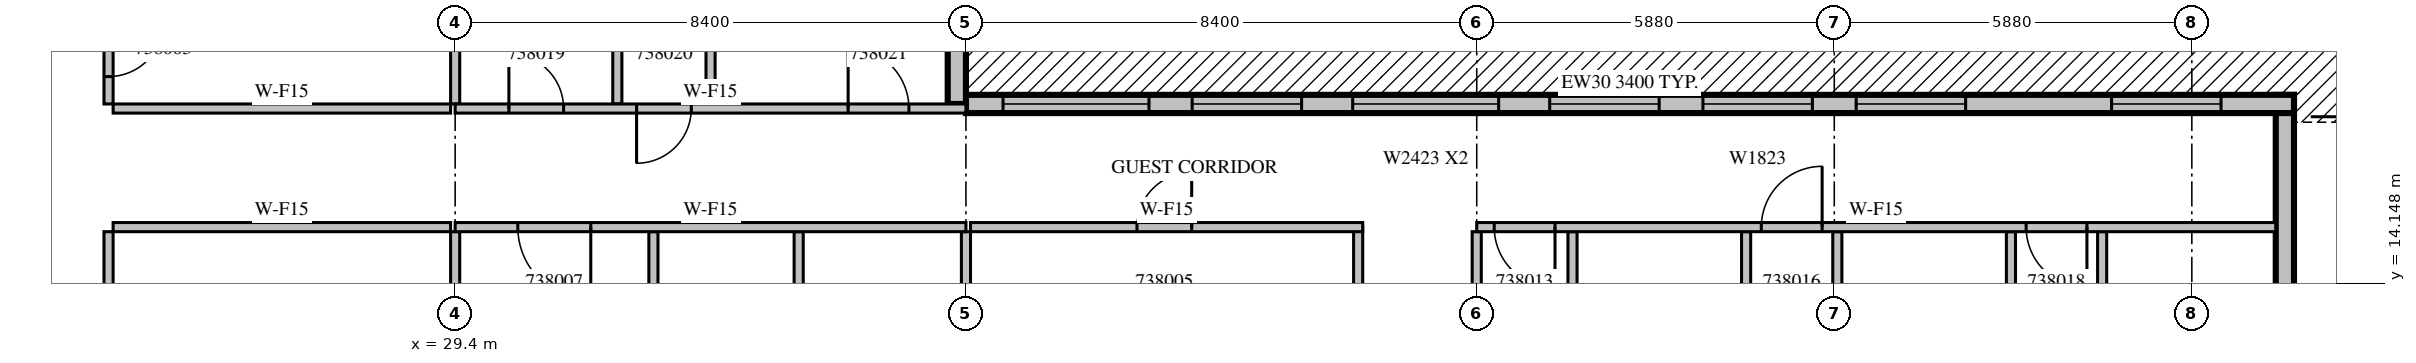
"""IFC4 building model, lengths in metres.
Left out: names, types, materials, properties, quantities, classifications, styles, units other than length and angle.
Written with IfcOpenShell. Run it as: python <this file> out.ifc"""

import sys

from ifc_helpers import new_model, si_unit, direction, frame, frame_2d, origin, place, context, subcontext, project, spatial, rectangle, extrude, source, transform, mapped, element, fill, save


model = new_model("IFC4")
c1 = context("Model", 3, precision=1e-05, world=origin(), true_north=direction((0.0, 1.0)))
c2 = subcontext(c1, "Body", "Model", "MODEL_VIEW")
j1 = project(units=[si_unit("LENGTHUNIT", "METRE"), si_unit("PLANEANGLEUNIT", "RADIAN")], contexts=[c1])
p1 = place(None, origin())
s1 = spatial("IfcSite", under=j1, at=p1, CompositionType="ELEMENT")
p2 = place(p1, origin())
s2 = spatial("IfcBuilding", under=s1, at=p2, CompositionType="ELEMENT")
p3 = place(p2, frame((0.0, 0.0, 177.8)))
s3 = spatial("IfcBuildingStorey", under=s2, at=p3, CompositionType="ELEMENT", Elevation=177.8)
p4 = place(p3, frame((59.49, 10.5, 0.0), z_axis=(0.0, 0.0, 1.0), x_axis=(0.0, 1.0, 0.0)))
e1 = element("IfcWall", 1, at=p4, inside=s3, PredefinedType="STANDARD", context=c2, shape_type="SweptSolid", body=[
    extrude(rectangle(XDim=6.75, YDim=0.3, at=frame_2d((3.375, 0.0))), origin(), (0.0, 0.0, 1.0), 3.4),
])
m1 = source(origin(), c2, "Body", "SweptSolid", [
    extrude(rectangle(XDim=1.8, YDim=2.4, at=frame_2d((0.9, 1.2))), frame((0.0, 0.16, 0.0), z_axis=(0.0, -1.0, 0.0), x_axis=(1.0, 0.0, 0.0)), (0.0, 0.0, 1.0), 0.32),
])
p5 = place(p4, frame((0.787, 0.0, 0.0)))
e2 = element("IfcOpeningElement", 2, at=p5, cuts=e1, PredefinedType="OPENING", context=c2, shape_type="MappedRepresentation", body=[
    mapped(m1, transform((0.0, 0.0, 0.0), scale=1.0)),
])
p6 = place(p3, frame((59.64, 17.1, 0.0), z_axis=(0.0, 0.0, 1.0), x_axis=(-1.0, 0.0, 0.0)))
e3 = element("IfcWall", 3, at=p6, inside=s3, PredefinedType="STANDARD", context=c2, shape_type="SweptSolid", body=[
    extrude(rectangle(XDim=21.84, YDim=0.3, at=frame_2d((10.92, 0.0))), origin(), (0.0, 0.0, 1.0), 3.4),
])
p7 = place(p6, frame((1.2, 0.0, 0.0)))
e4 = element("IfcOpeningElement", 4, at=p7, cuts=e3, PredefinedType="OPENING", context=c2, shape_type="MappedRepresentation", body=[
    mapped(m1, transform((0.0, 0.0, 0.0), scale=1.0)),
])
p8 = place(p6, frame((5.4, 0.0, 0.0)))
e5 = element("IfcOpeningElement", 5, at=p8, cuts=e3, PredefinedType="OPENING", context=c2, shape_type="MappedRepresentation", body=[
    mapped(m1, transform((0.0, 0.0, 0.0), scale=1.0)),
])
p9 = place(p6, frame((10.44, 0.0, 0.0)))
e6 = element("IfcOpeningElement", 6, at=p9, cuts=e3, PredefinedType="OPENING", context=c2, shape_type="MappedRepresentation", body=[
    mapped(m1, transform((0.0, 0.0, 0.0), scale=1.0)),
])
p10 = place(p6, frame((16.32, 0.0, 0.0)))
e7 = element("IfcOpeningElement", 7, at=p10, cuts=e3, PredefinedType="OPENING", context=c2, shape_type="MappedRepresentation", body=[
    mapped(m1, transform((0.0, 0.0, 0.0), scale=1.0)),
])
m2 = source(origin(), c2, "Body", "SweptSolid", [
    extrude(rectangle(XDim=1.8, YDim=2.3, at=frame_2d((0.9, 1.15))), frame((0.0, 0.16, 0.0), z_axis=(0.0, -1.0, 0.0), x_axis=(1.0, 0.0, 0.0)), (0.0, 0.0, 1.0), 0.32),
])
p11 = place(p6, frame((7.92, 0.0, 0.6)))
e8 = element("IfcOpeningElement", 8, at=p11, cuts=e3, PredefinedType="OPENING", context=c2, shape_type="MappedRepresentation", body=[
    mapped(m2, transform((0.0, 0.0, 0.0), scale=1.0)),
])
p12 = place(p6, frame((13.08, 0.0, 0.6)))
e9 = element("IfcOpeningElement", 9, at=p12, cuts=e3, PredefinedType="OPENING", context=c2, shape_type="SweptSolid", body=[
    extrude(rectangle(XDim=2.4, YDim=2.3, at=frame_2d((1.2, 1.15))), frame((0.0, 0.16, 0.0), z_axis=(0.0, -1.0, 0.0), x_axis=(1.0, 0.0, 0.0)), (0.0, 0.0, 1.0), 0.32),
])
m3 = source(origin(), c2, "Body", "SweptSolid", [
    extrude(rectangle(XDim=2.4, YDim=2.3, at=frame_2d((1.2, 1.15))), frame((0.0, 0.16, 0.0), z_axis=(0.0, -1.0, 0.0), x_axis=(1.0, 0.0, 0.0)), (0.0, 0.0, 1.0), 0.32),
])
p13 = place(p6, frame((18.83, 0.0, 0.6)))
e10 = element("IfcOpeningElement", 10, at=p13, cuts=e3, PredefinedType="OPENING", context=c2, shape_type="MappedRepresentation", body=[
    mapped(m3, transform((0.0, 0.0, 0.0), scale=1.0)),
])
p14 = place(p3, frame((37.65, 17.1, 0.0), z_axis=(0.0, 0.0, 1.0), x_axis=(0.0, 1.0, 0.0)))
e11 = element("IfcWall", 11, at=p14, inside=s3, PredefinedType="STANDARD", context=c2, shape_type="SweptSolid", body=[
    extrude(rectangle(XDim=3.0, YDim=0.3, at=frame_2d((1.5, 0.0))), origin(), (0.0, 0.0, 1.0), 3.4),
])
p15 = place(p14, frame((1.1, 0.0, 0.0)))
e12 = element("IfcOpeningElement", 12, at=p15, cuts=e11, PredefinedType="OPENING", context=c2, shape_type="MappedRepresentation", body=[
    mapped(m1, transform((0.0, 0.0, 0.0), scale=1.0)),
])
p16 = place(p3, frame((23.7, 15.0, 0.0), z_axis=(0.0, 0.0, 1.0), x_axis=(0.0, -1.0, 0.0)))
e13 = element("IfcWall", 13, at=p16, inside=s3, PredefinedType="PARTITIONING", context=c2, shape_type="SweptSolid", body=[
    extrude(rectangle(XDim=11.525, YDim=0.15, at=frame_2d((5.763, 0.0))), origin(), (0.0, 0.0, 1.0), 2.4),
])
m4 = source(origin(), c2, "Body", "SweptSolid", [
    extrude(rectangle(XDim=0.9, YDim=2.1, at=frame_2d((0.45, 1.05))), frame((0.0, 0.085, 0.0), z_axis=(0.0, -1.0, 0.0), x_axis=(1.0, 0.0, 0.0)), (0.0, 0.0, 1.0), 0.17),
])
p17 = place(p16, frame((9.363, 0.0, 0.0)))
e14 = element("IfcOpeningElement", 14, at=p17, cuts=e13, PredefinedType="OPENING", context=c2, shape_type="MappedRepresentation", body=[
    mapped(m4, transform((0.0, 0.0, 0.0), scale=1.0)),
])
p18 = place(p16, frame((2.725, 0.0, 0.0)))
e15 = element("IfcOpeningElement", 15, at=p18, cuts=e13, PredefinedType="OPENING", context=c2, shape_type="MappedRepresentation", body=[
    mapped(m4, transform((0.0, 0.0, 0.0), scale=1.0)),
])
p19 = place(p3, frame((23.7, 20.7, 0.0), z_axis=(0.0, 0.0, 1.0), x_axis=(0.0, -1.0, 0.0)))
e16 = element("IfcWall", 16, at=p19, inside=s3, PredefinedType="PARTITIONING", context=c2, shape_type="SweptSolid", body=[
    extrude(rectangle(XDim=3.6, YDim=0.15, at=frame_2d((1.8, 0.0))), origin(), (0.0, 0.0, 1.0), 3.4),
])
p20 = place(p19, frame((2.25, 0.0, 0.0)))
e17 = element("IfcOpeningElement", 17, at=p20, cuts=e16, PredefinedType="OPENING", context=c2, shape_type="MappedRepresentation", body=[
    mapped(m4, transform((0.0, 0.0, 0.0), scale=1.0)),
])
p21 = place(p3, frame((29.325, 15.075, 0.0), z_axis=(0.0, 0.0, 1.0), x_axis=(-1.0, 0.0, 0.0)))
e18 = element("IfcWall", 18, at=p21, inside=s3, PredefinedType="PARTITIONING", context=c2, shape_type="SweptSolid", body=[
    extrude(rectangle(XDim=5.55, YDim=0.15, at=frame_2d((2.775, 0.0))), origin(), (0.0, 0.0, 1.0), 3.4),
])
m5 = source(origin(), c2, "Body", "SweptSolid", [
    extrude(rectangle(XDim=5.55, YDim=0.15, at=frame_2d((2.775, 0.0))), origin(), (0.0, 0.0, 1.0), 3.4),
])
p22 = place(p3, frame((23.775, 17.025, 0.0), z_axis=(0.0, 0.0, 1.0), x_axis=(1.0, 0.0, 0.0)))
e19 = element("IfcWall", 19, at=p22, inside=s3, PredefinedType="PARTITIONING", context=c2, shape_type="MappedRepresentation", body=[
    mapped(m5, transform((0.0, 0.0, 0.0), scale=1.0)),
])
p23 = place(p3, frame((29.4, 10.949, 0.0), z_axis=(0.0, 0.0, 1.0), x_axis=(0.0, 1.0, 0.0)))
e20 = element("IfcWall", 20, at=p23, inside=s3, PredefinedType="PARTITIONING", context=c2, shape_type="SweptSolid", body=[
    extrude(rectangle(XDim=4.051, YDim=0.15, at=frame_2d((2.026, 0.0))), origin(), (0.0, 0.0, 1.0), 3.4),
])
p24 = place(p3, frame((29.4, 17.1, 0.0), z_axis=(0.0, 0.0, 1.0), x_axis=(0.0, 1.0, 0.0)))
e21 = element("IfcWall", 21, at=p24, inside=s3, PredefinedType="PARTITIONING", context=c2, shape_type="SweptSolid", body=[
    extrude(rectangle(XDim=3.001, YDim=0.15, at=frame_2d((1.5, 0.0))), origin(), (0.0, 0.0, 1.0), 3.4),
])
p25 = place(p3, frame((44.25, 11.1, 0.0), z_axis=(0.0, 0.0, 1.0), x_axis=(0.0, 1.0, 0.0)))
e22 = element("IfcWall", 22, at=p25, inside=s3, PredefinedType="PARTITIONING", context=c2, shape_type="SweptSolid", body=[
    extrude(rectangle(XDim=3.975, YDim=0.15, at=frame_2d((1.988, 0.0))), origin(), (0.0, 0.0, 1.0), 3.4),
])
m6 = source(origin(), c2, "Body", "SweptSolid", [
    extrude(rectangle(XDim=6.45, YDim=0.15, at=frame_2d((3.225, 0.0))), origin(), (0.0, 0.0, 1.0), 3.4),
])
p26 = place(p3, frame((44.325, 15.075, 0.0), z_axis=(0.0, 0.0, 1.0), x_axis=(-1.0, 0.0, 0.0)))
e23 = element("IfcWall", 23, at=p26, inside=s3, PredefinedType="PARTITIONING", context=c2, shape_type="MappedRepresentation", body=[
    mapped(m6, transform((0.0, 0.0, 0.0), scale=1.0)),
])
p27 = place(p26, frame((2.812, 0.0, 0.0)))
e24 = element("IfcOpeningElement", 24, at=p27, cuts=e23, PredefinedType="OPENING", context=c2, shape_type="MappedRepresentation", body=[
    mapped(m4, transform((0.0, 0.0, 0.0), scale=1.0)),
])
p28 = place(p3, frame((32.66, 11.1, 0.0), z_axis=(0.0, 0.0, 1.0), x_axis=(0.0, 1.0, 0.0)))
e25 = element("IfcWall", 25, at=p28, inside=s3, PredefinedType="PARTITIONING", context=c2, shape_type="SweptSolid", body=[
    extrude(rectangle(XDim=3.9, YDim=0.15, at=frame_2d((1.95, 0.0))), origin(), (0.0, 0.0, 1.0), 3.4),
])
m7 = source(origin(), c2, "Body", "SweptSolid", [
    extrude(rectangle(XDim=3.9, YDim=0.15, at=frame_2d((1.95, 0.0))), origin(), (0.0, 0.0, 1.0), 3.4),
])
for number, where, z_axis, x_axis in (
    (26, (35.049, 11.1, 0.0), (0.0, 0.0, 1.0), (0.0, 1.0, 0.0)),
    (27, (37.8, 11.1, 0.0), (0.0, 0.0, 1.0), (0.0, 1.0, 0.0)),
    (28, (47.775, 11.1, 0.0), (0.0, 0.0, 1.0), (0.0, 1.0, 0.0)),
    (29, (50.63, 11.1, 0.0), (0.0, 0.0, 1.0), (0.0, 1.0, 0.0)),
    (30, (52.13, 11.1, 0.0), (0.0, 0.0, 1.0), (0.0, 1.0, 0.0)),
    (31, (54.985, 11.1, 0.0), (0.0, 0.0, 1.0), (0.0, 1.0, 0.0)),
):
    element("IfcWall", number, at=place(p3, frame(where, z_axis=z_axis, x_axis=x_axis)), inside=s3, PredefinedType="PARTITIONING", context=c2, shape_type="MappedRepresentation", body=[
        mapped(m7, transform((0.0, 0.0, 0.0), scale=1.0)),
    ])
p29 = place(p3, frame((56.485, 11.1, 0.0), z_axis=(0.0, 0.0, 1.0), x_axis=(0.0, 1.0, 0.0)))
e32 = element("IfcWall", 32, at=p29, inside=s3, PredefinedType="PARTITIONING", context=c2, shape_type="MappedRepresentation", body=[
    mapped(m7, transform((0.0, 0.0, 0.0), scale=1.0)),
])
p30 = place(p29, frame((1.5, 0.0, 0.0)))
e33 = element("IfcOpeningElement", 33, at=p30, cuts=e32, PredefinedType="OPENING", context=c2, shape_type="MappedRepresentation", body=[
    mapped(m4, transform((0.0, 0.0, 0.0), scale=1.0)),
])
p31 = place(p3, frame((46.2, 11.1, 0.0), z_axis=(0.0, 0.0, 1.0), x_axis=(0.0, 1.0, 0.0)))
e34 = element("IfcWall", 34, at=p31, inside=s3, PredefinedType="PARTITIONING", context=c2, shape_type="MappedRepresentation", body=[
    mapped(m7, transform((0.0, 0.0, 0.0), scale=1.0)),
])
m8 = source(origin(), c2, "Body", "SweptSolid", [
    extrude(rectangle(XDim=3.6, YDim=0.15, at=frame_2d((1.8, 0.0))), origin(), (0.0, 0.0, 1.0), 3.4),
])
for number, where, z_axis, x_axis in (
    (35, (32.067, 20.7, 0.0), (0.0, 0.0, 1.0), (0.0, -1.0, 0.0)),
    (36, (33.6, 17.1, 0.0), (0.0, 0.0, 1.0), (0.0, 1.0, 0.0)),
):
    element("IfcWall", number, at=place(p3, frame(where, z_axis=z_axis, x_axis=x_axis)), inside=s3, PredefinedType="PARTITIONING", context=c2, shape_type="MappedRepresentation", body=[
        mapped(m8, transform((0.0, 0.0, 0.0), scale=1.0)),
    ])
m9 = source(origin(), c2, "Body", "SweptSolid", [
    extrude(rectangle(XDim=8.4, YDim=0.15, at=frame_2d((4.2, 0.0))), origin(), (0.0, 0.0, 1.0), 3.4),
])
p32 = place(p3, frame((37.8, 15.075, 0.0), z_axis=(0.0, 0.0, 1.0), x_axis=(-1.0, 0.0, 0.0)))
e37 = element("IfcWall", 37, at=p32, inside=s3, PredefinedType="PARTITIONING", context=c2, shape_type="MappedRepresentation", body=[
    mapped(m9, transform((0.0, 0.0, 0.0), scale=1.0)),
])
m10 = source(origin(), c2, "Body", "SweptSolid", [
    extrude(rectangle(XDim=1.2, YDim=2.1, at=frame_2d((0.6, 1.05))), frame((0.0, 0.085, 0.0), z_axis=(0.0, -1.0, 0.0), x_axis=(1.0, 0.0, 0.0)), (0.0, 0.0, 1.0), 0.17),
])
p33 = place(p32, frame((6.17, 0.0, 0.0)))
e38 = element("IfcOpeningElement", 38, at=p33, cuts=e37, PredefinedType="OPENING", context=c2, shape_type="MappedRepresentation", body=[
    mapped(m10, transform((0.0, 0.0, 0.0), scale=1.0)),
])
m11 = source(origin(), c2, "Body", "SweptSolid", [
    extrude(rectangle(XDim=13.14, YDim=0.15, at=frame_2d((6.57, 0.0))), origin(), (0.0, 0.0, 1.0), 3.4),
])
p34 = place(p3, frame((59.34, 15.075, 0.0), z_axis=(0.0, 0.0, 1.0), x_axis=(-1.0, 0.0, 0.0)))
e39 = element("IfcWall", 39, at=p34, inside=s3, PredefinedType="PARTITIONING", context=c2, shape_type="MappedRepresentation", body=[
    mapped(m11, transform((0.0, 0.0, 0.0), scale=1.0)),
])
m12 = source(origin(), c2, "Body", "SweptSolid", [
    extrude(rectangle(XDim=1.0, YDim=2.1, at=frame_2d((0.5, 1.05))), frame((0.0, 0.085, 0.0), z_axis=(0.0, -1.0, 0.0), x_axis=(1.0, 0.0, 0.0)), (0.0, 0.0, 1.0), 0.17),
])
p35 = place(p34, frame((11.852, 0.0, 0.0)))
e40 = element("IfcOpeningElement", 40, at=p35, cuts=e39, PredefinedType="OPENING", context=c2, shape_type="MappedRepresentation", body=[
    mapped(m12, transform((0.0, 0.0, 0.0), scale=1.0)),
])
p36 = place(p34, frame((7.46, 0.0, 0.0)))
e41 = element("IfcOpeningElement", 41, at=p36, cuts=e39, PredefinedType="OPENING", context=c2, shape_type="MappedRepresentation", body=[
    mapped(m12, transform((0.0, 0.0, 0.0), scale=1.0)),
])
p37 = place(p34, frame((3.105, 0.0, 0.0)))
e42 = element("IfcOpeningElement", 42, at=p37, cuts=e39, PredefinedType="OPENING", context=c2, shape_type="MappedRepresentation", body=[
    mapped(m12, transform((0.0, 0.0, 0.0), scale=1.0)),
])
p38 = place(p3, frame((29.4, 17.025, 0.0), z_axis=(0.0, 0.0, 1.0), x_axis=(1.0, 0.0, 0.0)))
e43 = element("IfcWall", 43, at=p38, inside=s3, PredefinedType="PARTITIONING", context=c2, shape_type="MappedRepresentation", body=[
    mapped(m9, transform((0.0, 0.0, 0.0), scale=1.0)),
])
p39 = place(p38, frame((0.883, 0.0, 0.0)))
e44 = element("IfcOpeningElement", 44, at=p39, cuts=e43, PredefinedType="OPENING", context=c2, shape_type="MappedRepresentation", body=[
    mapped(m4, transform((0.0, 0.0, 0.0), scale=1.0)),
])
p40 = place(p38, frame((2.983, 0.0, 0.0)))
e45 = element("IfcOpeningElement", 45, at=p40, cuts=e43, PredefinedType="OPENING", context=c2, shape_type="MappedRepresentation", body=[
    mapped(m4, transform((0.0, 0.0, 0.0), scale=1.0)),
])
p41 = place(p38, frame((6.463, 0.0, 0.0)))
e46 = element("IfcOpeningElement", 46, at=p41, cuts=e43, PredefinedType="OPENING", context=c2, shape_type="MappedRepresentation", body=[
    mapped(m12, transform((0.0, 0.0, 0.0), scale=1.0)),
])
m13 = source(origin(), c2, "Body", "SweptSolid", [
    extrude(rectangle(XDim=1.8, YDim=2.4, at=frame_2d((0.9, 1.2))), frame((0.0, 0.025, 0.0), z_axis=(0.0, -1.0, 0.0), x_axis=(1.0, 0.0, 0.0)), (0.0, 0.0, 1.0), 0.05),
])
p42 = place(p7, origin())
e47 = element("IfcDoor", 47, at=p42, inside=s3, OperationType="SLIDING_TO_LEFT", PredefinedType="DOOR", context=c2, shape_type="MappedRepresentation", body=[
    mapped(m13, transform((0.0, 0.0, 0.0), scale=1.0)),
])
fill(e4, e47)
p43 = place(p8, origin())
e48 = element("IfcDoor", 48, at=p43, inside=s3, OperationType="SLIDING_TO_LEFT", PredefinedType="DOOR", context=c2, shape_type="MappedRepresentation", body=[
    mapped(m13, transform((0.0, 0.0, 0.0), scale=1.0)),
])
fill(e5, e48)
p44 = place(p9, origin())
e49 = element("IfcDoor", 49, at=p44, inside=s3, OperationType="SLIDING_TO_LEFT", PredefinedType="DOOR", context=c2, shape_type="MappedRepresentation", body=[
    mapped(m13, transform((0.0, 0.0, 0.0), scale=1.0)),
])
fill(e6, e49)
p45 = place(p10, origin())
e50 = element("IfcDoor", 50, at=p45, inside=s3, OperationType="SLIDING_TO_LEFT", PredefinedType="DOOR", context=c2, shape_type="MappedRepresentation", body=[
    mapped(m13, transform((0.0, 0.0, 0.0), scale=1.0)),
])
fill(e7, e50)
m14 = source(origin(), c2, "Body", "SweptSolid", [
    extrude(rectangle(XDim=1.8, YDim=2.3, at=frame_2d((0.9, 1.15))), frame((0.0, 0.03, 0.0), z_axis=(0.0, -1.0, 0.0), x_axis=(1.0, 0.0, 0.0)), (0.0, 0.0, 1.0), 0.06),
])
p46 = place(p11, origin())
e51 = element("IfcWindow", 51, at=p46, inside=s3, PartitioningType="SINGLE_PANEL", PredefinedType="WINDOW", context=c2, shape_type="MappedRepresentation", body=[
    mapped(m14, transform((0.0, 0.0, 0.0), scale=1.0)),
])
fill(e8, e51)
p47 = place(p12, origin())
e52 = element("IfcWindow", 52, at=p47, inside=s3, PartitioningType="SINGLE_PANEL", PredefinedType="WINDOW", context=c2, shape_type="SweptSolid", body=[
    extrude(rectangle(XDim=2.4, YDim=2.3, at=frame_2d((1.2, 1.15))), frame((0.0, 0.03, 0.0), z_axis=(0.0, -1.0, 0.0), x_axis=(1.0, 0.0, 0.0)), (0.0, 0.0, 1.0), 0.06),
])
fill(e9, e52)
m15 = source(origin(), c2, "Body", "SweptSolid", [
    extrude(rectangle(XDim=2.4, YDim=2.3, at=frame_2d((1.2, 1.15))), frame((0.0, 0.03, 0.0), z_axis=(0.0, -1.0, 0.0), x_axis=(1.0, 0.0, 0.0)), (0.0, 0.0, 1.0), 0.06),
])
p48 = place(p13, origin())
e53 = element("IfcWindow", 53, at=p48, inside=s3, PartitioningType="SINGLE_PANEL", PredefinedType="WINDOW", context=c2, shape_type="MappedRepresentation", body=[
    mapped(m15, transform((0.0, 0.0, 0.0), scale=1.0)),
])
fill(e10, e53)
m16 = source(origin(), c2, "Body", "SweptSolid", [
    extrude(rectangle(XDim=0.9, YDim=2.1, at=frame_2d((0.45, 1.05))), frame((0.0, 0.025, 0.0), z_axis=(0.0, -1.0, 0.0), x_axis=(1.0, 0.0, 0.0)), (0.0, 0.0, 1.0), 0.05),
])
p49 = place(p20, origin())
e54 = element("IfcDoor", 54, at=p49, inside=s3, OperationType="SINGLE_SWING_LEFT", PredefinedType="DOOR", context=c2, shape_type="MappedRepresentation", body=[
    mapped(m16, transform((0.0, 0.0, 0.0), scale=1.0)),
])
fill(e17, e54)
p50 = place(p27, origin())
e55 = element("IfcDoor", 55, at=p50, inside=s3, OperationType="SINGLE_SWING_RIGHT", PredefinedType="DOOR", context=c2, shape_type="MappedRepresentation", body=[
    mapped(m16, transform((0.0, 0.0, 0.0), scale=1.0)),
])
fill(e24, e55)
m17 = source(origin(), c2, "Body", "SweptSolid", [
    extrude(rectangle(XDim=1.2, YDim=2.1, at=frame_2d((0.6, 1.05))), frame((0.0, 0.025, 0.0), z_axis=(0.0, -1.0, 0.0), x_axis=(1.0, 0.0, 0.0)), (0.0, 0.0, 1.0), 0.05),
])
p51 = place(p33, origin())
e56 = element("IfcDoor", 56, at=p51, inside=s3, OperationType="SINGLE_SWING_LEFT", PredefinedType="DOOR", context=c2, shape_type="MappedRepresentation", body=[
    mapped(m17, transform((0.0, 0.0, 0.0), scale=1.0)),
])
fill(e38, e56)
m18 = source(origin(), c2, "Body", "SweptSolid", [
    extrude(rectangle(XDim=1.0, YDim=2.1, at=frame_2d((0.5, 1.05))), frame((0.0, 0.025, 0.0), z_axis=(0.0, -1.0, 0.0), x_axis=(1.0, 0.0, 0.0)), (0.0, 0.0, 1.0), 0.05),
])
p52 = place(p35, origin())
e57 = element("IfcDoor", 57, at=p52, inside=s3, OperationType="SINGLE_SWING_LEFT", PredefinedType="DOOR", context=c2, shape_type="MappedRepresentation", body=[
    mapped(m18, transform((0.0, 0.0, 0.0), scale=1.0)),
])
fill(e40, e57)
p53 = place(p36, origin())
e58 = element("IfcDoor", 58, at=p53, inside=s3, OperationType="SINGLE_SWING_RIGHT", PredefinedType="DOOR", context=c2, shape_type="MappedRepresentation", body=[
    mapped(m18, transform((0.0, 0.0, 0.0), scale=1.0)),
])
fill(e41, e58)
p54 = place(p37, origin())
e59 = element("IfcDoor", 59, at=p54, inside=s3, OperationType="SINGLE_SWING_LEFT", PredefinedType="DOOR", context=c2, shape_type="MappedRepresentation", body=[
    mapped(m18, transform((0.0, 0.0, 0.0), scale=1.0)),
])
fill(e42, e59)
p55 = place(p39, origin())
e60 = element("IfcDoor", 60, at=p55, inside=s3, OperationType="SINGLE_SWING_LEFT", PredefinedType="DOOR", context=c2, shape_type="MappedRepresentation", body=[
    mapped(m16, transform((0.0, 0.0, 0.0), scale=1.0)),
])
fill(e44, e60)
p56 = place(p40, origin())
e61 = element("IfcDoor", 61, at=p56, inside=s3, OperationType="SINGLE_SWING_RIGHT", PredefinedType="DOOR", context=c2, shape_type="MappedRepresentation", body=[
    mapped(m16, transform((0.0, 0.0, 0.0), scale=1.0)),
])
fill(e45, e61)
p57 = place(p41, origin())
e62 = element("IfcDoor", 62, at=p57, inside=s3, OperationType="SINGLE_SWING_LEFT", PredefinedType="DOOR", context=c2, shape_type="MappedRepresentation", body=[
    mapped(m18, transform((0.0, 0.0, 0.0), scale=1.0)),
])
fill(e46, e62)
save(model, sys.argv[1])
